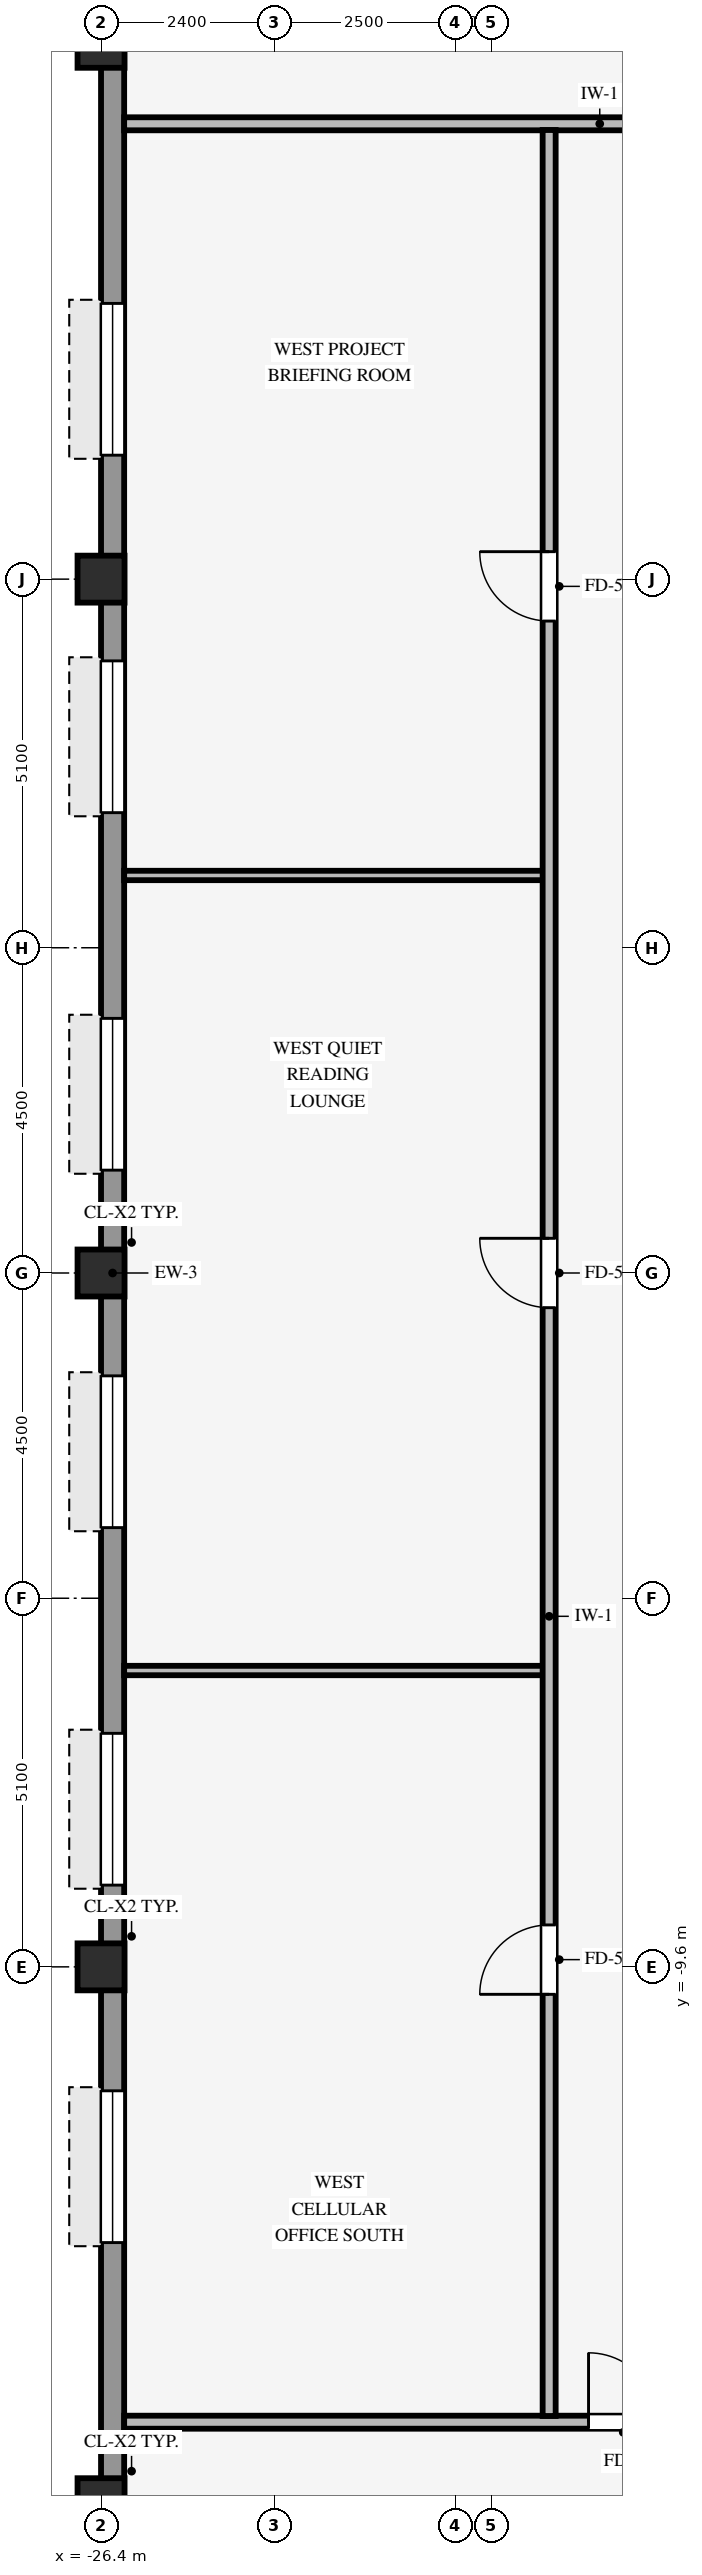
"""IFC4 building model, lengths in metres.
Left out: names, types, materials, properties, quantities, classifications, styles, units other than length and angle.
Written with IfcOpenShell. Run it as: python <this file> out.ifc"""

import sys

from ifc_helpers import new_model, si_unit, direction, frame, frame_2d, origin, origin_2d, place, context, subcontext, project, spatial, rectangle, hollow_rectangle, extrude, source, transform, mapped, element, fill, save


model = new_model("IFC4")
c1 = context("Model", 3, precision=1e-05, world=origin(), true_north=direction((0.0, 1.0)))
c2 = subcontext(c1, "Body", "Model", "MODEL_VIEW")
j1 = project(units=[si_unit("LENGTHUNIT", "METRE"), si_unit("PLANEANGLEUNIT", "RADIAN")], contexts=[c1])
p1 = place(None, origin())
s1 = spatial("IfcSite", under=j1, at=p1, CompositionType="ELEMENT")
p2 = place(p1, origin())
s2 = spatial("IfcBuilding", under=s1, at=p2, CompositionType="ELEMENT")
p3 = place(p2, frame((0.0, 0.0, 149.4)))
s3 = spatial("IfcBuildingStorey", under=s2, at=p3, CompositionType="ELEMENT", Elevation=149.4)
for number, where, z_axis, x_axis in (
    (1, (-26.4, -17.0, 0.0), (0.0, 0.0, 1.0), (1.0, 0.0, 0.0)),
    (2, (-26.4, -9.6, 0.0), (0.0, 0.0, 1.0), (1.0, 0.0, 0.0)),
    (3, (-26.4, 0.0, 0.0), (0.0, 0.0, 1.0), (1.0, 0.0, 0.0)),
    (4, (-26.4, 9.6, 0.0), (0.0, 0.0, 1.0), (1.0, 0.0, 0.0)),
    (5, (-26.4, 17.0, 0.0), (0.0, 0.0, 1.0), (1.0, 0.0, 0.0)),
):
    element("IfcColumn", number, at=place(p3, frame(where, z_axis=z_axis, x_axis=x_axis)), inside=s3, PredefinedType="COLUMN", context=c2, shape_type="SweptSolid", body=[
        extrude(hollow_rectangle(XDim=0.65, YDim=0.65, WallThickness=0.04, InnerFilletRadius=0.04, OuterFilletRadius=0.08, at=origin_2d()), origin(), (0.0, 0.0, 1.0), 3.37),
    ])
p4 = place(p3, frame((-26.24, -20.784, 0.0), z_axis=(0.0, 0.0, 1.0), x_axis=(0.0, 1.0, 0.0)))
e6 = element("IfcWall", 6, at=p4, inside=s3, PredefinedType="STANDARD", context=c2, shape_type="SweptSolid", body=[
    extrude(rectangle(XDim=41.568, YDim=0.32, at=frame_2d((20.784, 0.0))), origin(), (0.0, 0.0, 1.0), 2.705),
])
p5 = place(p4, frame((7.369, 0.0, 0.8)))
e7 = element("IfcOpeningElement", 7, at=p5, cuts=e6, PredefinedType="OPENING", context=c2, shape_type="SweptSolid", body=[
    extrude(rectangle(XDim=2.1, YDim=1.56, at=frame_2d((1.05, 0.78))), frame((0.0, 0.17, 0.0), z_axis=(0.0, -1.0, 0.0), x_axis=(1.0, 0.0, 0.0)), (0.0, 0.0, 1.0), 0.34),
])
p6 = place(p4, frame((12.315, 0.0, 0.8)))
e8 = element("IfcOpeningElement", 8, at=p6, cuts=e6, PredefinedType="OPENING", context=c2, shape_type="SweptSolid", body=[
    extrude(rectangle(XDim=2.1, YDim=1.56, at=frame_2d((1.05, 0.78))), frame((0.0, 0.17, 0.0), z_axis=(0.0, -1.0, 0.0), x_axis=(1.0, 0.0, 0.0)), (0.0, 0.0, 1.0), 0.34),
])
p7 = place(p4, frame((17.261, 0.0, 0.8)))
e9 = element("IfcOpeningElement", 9, at=p7, cuts=e6, PredefinedType="OPENING", context=c2, shape_type="SweptSolid", body=[
    extrude(rectangle(XDim=2.1, YDim=1.56, at=frame_2d((1.05, 0.78))), frame((0.0, 0.17, 0.0), z_axis=(0.0, -1.0, 0.0), x_axis=(1.0, 0.0, 0.0)), (0.0, 0.0, 1.0), 0.34),
])
p8 = place(p4, frame((22.207, 0.0, 0.8)))
e10 = element("IfcOpeningElement", 10, at=p8, cuts=e6, PredefinedType="OPENING", context=c2, shape_type="SweptSolid", body=[
    extrude(rectangle(XDim=2.1, YDim=1.56, at=frame_2d((1.05, 0.78))), frame((0.0, 0.17, 0.0), z_axis=(0.0, -1.0, 0.0), x_axis=(1.0, 0.0, 0.0)), (0.0, 0.0, 1.0), 0.34),
])
p9 = place(p4, frame((27.153, 0.0, 0.8)))
e11 = element("IfcOpeningElement", 11, at=p9, cuts=e6, PredefinedType="OPENING", context=c2, shape_type="SweptSolid", body=[
    extrude(rectangle(XDim=2.1, YDim=1.56, at=frame_2d((1.05, 0.78))), frame((0.0, 0.17, 0.0), z_axis=(0.0, -1.0, 0.0), x_axis=(1.0, 0.0, 0.0)), (0.0, 0.0, 1.0), 0.34),
])
p10 = place(p4, frame((32.099, 0.0, 0.8)))
e12 = element("IfcOpeningElement", 12, at=p10, cuts=e6, PredefinedType="OPENING", context=c2, shape_type="SweptSolid", body=[
    extrude(rectangle(XDim=2.1, YDim=1.56, at=frame_2d((1.05, 0.78))), frame((0.0, 0.17, 0.0), z_axis=(0.0, -1.0, 0.0), x_axis=(1.0, 0.0, 0.0)), (0.0, 0.0, 1.0), 0.34),
])
p11 = place(p3, frame((-26.08, -15.9, 0.0), z_axis=(0.0, 0.0, 1.0), x_axis=(1.0, 0.0, 0.0)))
e13 = element("IfcWall", 13, at=p11, inside=s3, PredefinedType="PARTITIONING", context=c2, shape_type="SweptSolid", body=[
    extrude(rectangle(XDim=52.16, YDim=0.18, at=frame_2d((26.08, 0.0))), origin(), (0.0, 0.0, 1.0), 3.36),
])
p12 = place(p11, frame((24.5, 0.0, 0.0)))
e14 = element("IfcOpeningElement", 14, at=p12, cuts=e13, PredefinedType="OPENING", context=c2, shape_type="SweptSolid", body=[
    extrude(rectangle(XDim=0.96, YDim=2.1, at=frame_2d((0.48, 1.05))), frame((0.0, 0.1, 0.0), z_axis=(0.0, -1.0, 0.0), x_axis=(1.0, 0.0, 0.0)), (0.0, 0.0, 1.0), 0.2),
])
p13 = place(p11, frame((40.5, 0.0, 0.0)))
e15 = element("IfcOpeningElement", 15, at=p13, cuts=e13, PredefinedType="OPENING", context=c2, shape_type="SweptSolid", body=[
    extrude(rectangle(XDim=0.96, YDim=2.1, at=frame_2d((0.48, 1.05))), frame((0.0, 0.1, 0.0), z_axis=(0.0, -1.0, 0.0), x_axis=(1.0, 0.0, 0.0)), (0.0, 0.0, 1.0), 0.2),
])
p14 = place(p11, frame((13.16, 0.0, 0.0)))
e16 = element("IfcOpeningElement", 16, at=p14, cuts=e13, PredefinedType="OPENING", context=c2, shape_type="SweptSolid", body=[
    extrude(rectangle(XDim=0.96, YDim=2.1, at=frame_2d((0.48, 1.05))), frame((0.0, 0.1, 0.0), z_axis=(0.0, -1.0, 0.0), x_axis=(1.0, 0.0, 0.0)), (0.0, 0.0, 1.0), 0.2),
])
p15 = place(p11, frame((6.425, 0.0, 0.0)))
e17 = element("IfcOpeningElement", 17, at=p15, cuts=e13, PredefinedType="OPENING", context=c2, shape_type="SweptSolid", body=[
    extrude(rectangle(XDim=0.96, YDim=2.1, at=frame_2d((0.48, 1.05))), frame((0.0, 0.1, 0.0), z_axis=(0.0, -1.0, 0.0), x_axis=(1.0, 0.0, 0.0)), (0.0, 0.0, 1.0), 0.2),
])
for number, where, z_axis, x_axis in (
    (18, (-26.08, -5.5, 0.0), (0.0, 0.0, 1.0), (1.0, 0.0, 0.0)),
    (19, (-26.08, 5.5, 0.0), (0.0, 0.0, 1.0), (1.0, 0.0, 0.0)),
):
    element("IfcWall", number, at=place(p3, frame(where, z_axis=z_axis, x_axis=x_axis)), inside=s3, PredefinedType="PARTITIONING", context=c2, shape_type="SweptSolid", body=[
        extrude(rectangle(XDim=5.794, YDim=0.13, at=frame_2d((2.897, 0.0))), origin(), (0.0, 0.0, 1.0), 3.36),
    ])
p16 = place(p3, frame((-26.08, 15.9, 0.0), z_axis=(0.0, 0.0, 1.0), x_axis=(1.0, 0.0, 0.0)))
e20 = element("IfcWall", 20, at=p16, inside=s3, PredefinedType="PARTITIONING", context=c2, shape_type="SweptSolid", body=[
    extrude(rectangle(XDim=52.16, YDim=0.18, at=frame_2d((26.08, 0.0))), origin(), (0.0, 0.0, 1.0), 3.36),
])
p17 = place(p16, frame((26.72, 0.0, 0.0)))
e21 = element("IfcOpeningElement", 21, at=p17, cuts=e20, PredefinedType="OPENING", context=c2, shape_type="SweptSolid", body=[
    extrude(rectangle(XDim=0.96, YDim=2.1, at=frame_2d((0.48, 1.05))), frame((0.0, 0.1, 0.0), z_axis=(0.0, -1.0, 0.0), x_axis=(1.0, 0.0, 0.0)), (0.0, 0.0, 1.0), 0.2),
])
p18 = place(p16, frame((40.5, 0.0, 0.0)))
e22 = element("IfcOpeningElement", 22, at=p18, cuts=e20, PredefinedType="OPENING", context=c2, shape_type="SweptSolid", body=[
    extrude(rectangle(XDim=0.96, YDim=2.1, at=frame_2d((0.48, 1.05))), frame((0.0, 0.1, 0.0), z_axis=(0.0, -1.0, 0.0), x_axis=(1.0, 0.0, 0.0)), (0.0, 0.0, 1.0), 0.2),
])
p19 = place(p16, frame((13.61, 0.0, 0.0)))
e23 = element("IfcOpeningElement", 23, at=p19, cuts=e20, PredefinedType="OPENING", context=c2, shape_type="SweptSolid", body=[
    extrude(rectangle(XDim=0.96, YDim=2.1, at=frame_2d((0.48, 1.05))), frame((0.0, 0.1, 0.0), z_axis=(0.0, -1.0, 0.0), x_axis=(1.0, 0.0, 0.0)), (0.0, 0.0, 1.0), 0.2),
])
p20 = place(p3, frame((-20.2, -15.814, 0.0), z_axis=(0.0, 0.0, 1.0), x_axis=(0.0, 1.0, 0.0)))
e24 = element("IfcWall", 24, at=p20, inside=s3, PredefinedType="PARTITIONING", context=c2, shape_type="SweptSolid", body=[
    extrude(rectangle(XDim=31.628, YDim=0.18, at=frame_2d((15.814, 0.0))), origin(), (0.0, 0.0, 1.0), 3.36),
])
p21 = place(p20, frame((15.334, 0.0, 0.0)))
e25 = element("IfcOpeningElement", 25, at=p21, cuts=e24, PredefinedType="OPENING", context=c2, shape_type="SweptSolid", body=[
    extrude(rectangle(XDim=0.96, YDim=2.1, at=frame_2d((0.48, 1.05))), frame((0.0, 0.1, 0.0), z_axis=(0.0, -1.0, 0.0), x_axis=(1.0, 0.0, 0.0)), (0.0, 0.0, 1.0), 0.2),
])
p22 = place(p20, frame((5.834, 0.0, 0.0)))
e26 = element("IfcOpeningElement", 26, at=p22, cuts=e24, PredefinedType="OPENING", context=c2, shape_type="SweptSolid", body=[
    extrude(rectangle(XDim=0.96, YDim=2.1, at=frame_2d((0.48, 1.05))), frame((0.0, 0.1, 0.0), z_axis=(0.0, -1.0, 0.0), x_axis=(1.0, 0.0, 0.0)), (0.0, 0.0, 1.0), 0.2),
])
p23 = place(p20, frame((24.834, 0.0, 0.0)))
e27 = element("IfcOpeningElement", 27, at=p23, cuts=e24, PredefinedType="OPENING", context=c2, shape_type="SweptSolid", body=[
    extrude(rectangle(XDim=0.96, YDim=2.1, at=frame_2d((0.48, 1.05))), frame((0.0, 0.1, 0.0), z_axis=(0.0, -1.0, 0.0), x_axis=(1.0, 0.0, 0.0)), (0.0, 0.0, 1.0), 0.2),
])
m1 = source(origin(), c2, "Body", "SweptSolid", [
    extrude(rectangle(XDim=2.1, YDim=1.56, at=frame_2d((1.05, 0.78))), frame((0.0, 0.03, 0.0), z_axis=(0.0, -1.0, 0.0), x_axis=(1.0, 0.0, 0.0)), (0.0, 0.0, 1.0), 0.06),
])
p24 = place(p5, origin())
e28 = element("IfcWindow", 28, at=p24, inside=s3, PartitioningType="SINGLE_PANEL", PredefinedType="WINDOW", context=c2, shape_type="MappedRepresentation", body=[
    mapped(m1, transform((0.0, 0.0, 0.0), scale=1.0)),
])
fill(e7, e28)
p25 = place(p6, origin())
e29 = element("IfcWindow", 29, at=p25, inside=s3, PartitioningType="SINGLE_PANEL", PredefinedType="WINDOW", context=c2, shape_type="MappedRepresentation", body=[
    mapped(m1, transform((0.0, 0.0, 0.0), scale=1.0)),
])
fill(e8, e29)
p26 = place(p7, origin())
e30 = element("IfcWindow", 30, at=p26, inside=s3, PartitioningType="SINGLE_PANEL", PredefinedType="WINDOW", context=c2, shape_type="MappedRepresentation", body=[
    mapped(m1, transform((0.0, 0.0, 0.0), scale=1.0)),
])
fill(e9, e30)
p27 = place(p8, origin())
e31 = element("IfcWindow", 31, at=p27, inside=s3, PartitioningType="SINGLE_PANEL", PredefinedType="WINDOW", context=c2, shape_type="MappedRepresentation", body=[
    mapped(m1, transform((0.0, 0.0, 0.0), scale=1.0)),
])
fill(e10, e31)
p28 = place(p9, origin())
e32 = element("IfcWindow", 32, at=p28, inside=s3, PartitioningType="SINGLE_PANEL", PredefinedType="WINDOW", context=c2, shape_type="MappedRepresentation", body=[
    mapped(m1, transform((0.0, 0.0, 0.0), scale=1.0)),
])
fill(e11, e32)
p29 = place(p10, origin())
e33 = element("IfcWindow", 33, at=p29, inside=s3, PartitioningType="SINGLE_PANEL", PredefinedType="WINDOW", context=c2, shape_type="MappedRepresentation", body=[
    mapped(m1, transform((0.0, 0.0, 0.0), scale=1.0)),
])
fill(e12, e33)
m2 = source(origin(), c2, "Body", "SweptSolid", [
    extrude(rectangle(XDim=0.96, YDim=2.1, at=frame_2d((0.48, 1.05))), frame((0.0, 0.025, 0.0), z_axis=(0.0, -1.0, 0.0), x_axis=(1.0, 0.0, 0.0)), (0.0, 0.0, 1.0), 0.05),
])
p30 = place(p21, origin())
e34 = element("IfcDoor", 34, at=p30, inside=s3, OperationType="SINGLE_SWING_RIGHT", PredefinedType="DOOR", context=c2, shape_type="MappedRepresentation", body=[
    mapped(m2, transform((0.0, 0.0, 0.0), scale=1.0)),
])
fill(e25, e34)
p31 = place(p22, origin())
e35 = element("IfcDoor", 35, at=p31, inside=s3, OperationType="SINGLE_SWING_LEFT", PredefinedType="DOOR", context=c2, shape_type="MappedRepresentation", body=[
    mapped(m2, transform((0.0, 0.0, 0.0), scale=1.0)),
])
fill(e26, e35)
p32 = place(p23, origin())
e36 = element("IfcDoor", 36, at=p32, inside=s3, OperationType="SINGLE_SWING_RIGHT", PredefinedType="DOOR", context=c2, shape_type="MappedRepresentation", body=[
    mapped(m2, transform((0.0, 0.0, 0.0), scale=1.0)),
])
fill(e27, e36)
p33 = place(p15, origin())
e37 = element("IfcDoor", 37, at=p33, inside=s3, OperationType="SINGLE_SWING_LEFT", PredefinedType="DOOR", context=c2, shape_type="MappedRepresentation", body=[
    mapped(m2, transform((0.0, 0.0, 0.0), scale=1.0)),
])
fill(e17, e37)
save(model, sys.argv[1])
